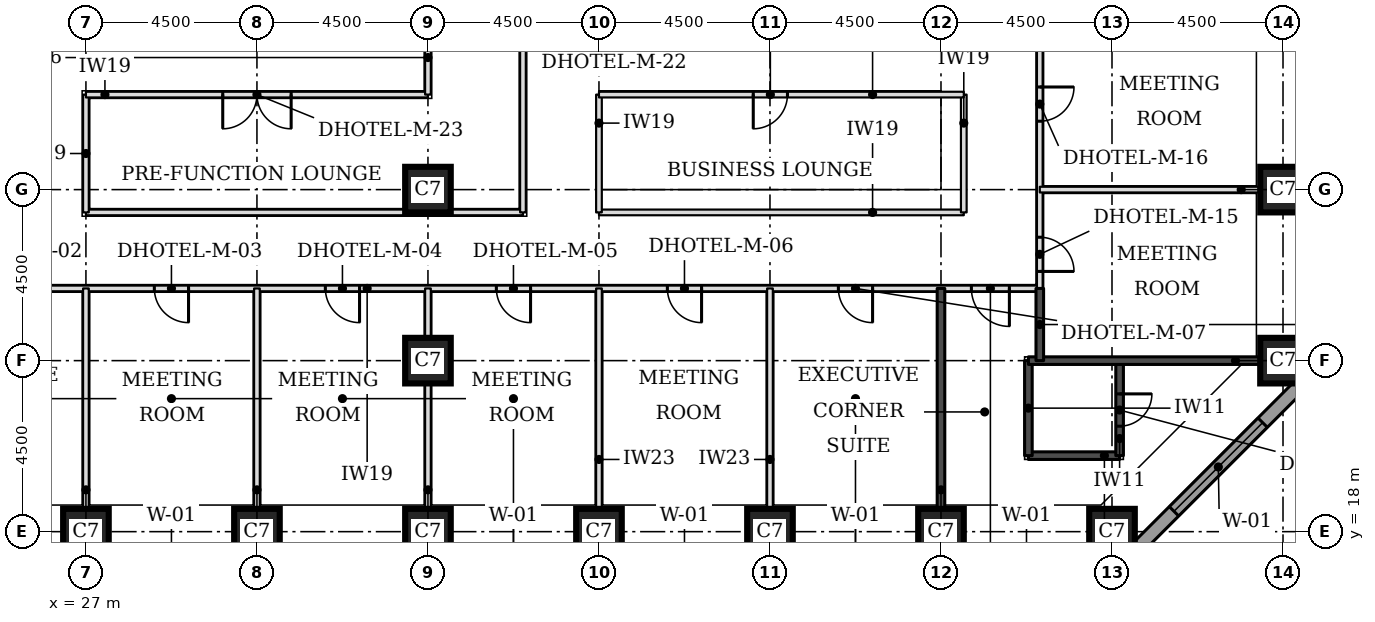
"""IFC4 building model, lengths in metres.
Left out: names, types, materials, properties, quantities, classifications, styles, units other than length and angle.
Written with IfcOpenShell. Run it as: python <this file> out.ifc"""

import sys

from ifc_helpers import new_model, si_unit, direction, frame, frame_2d, origin, origin_2d, place, context, subcontext, project, spatial, rectangle, extrude, element, fill, save


model = new_model("IFC4")
c1 = context("Model", 3, precision=1e-05, world=origin(), true_north=direction((0.0, 1.0)))
c2 = subcontext(c1, "Body", "Model", "MODEL_VIEW")
j1 = project(units=[si_unit("LENGTHUNIT", "METRE"), si_unit("PLANEANGLEUNIT", "RADIAN")], contexts=[c1])
p1 = place(None, origin())
s1 = spatial("IfcSite", under=j1, at=p1, CompositionType="ELEMENT")
p2 = place(p1, origin())
s2 = spatial("IfcBuilding", under=s1, at=p2, CompositionType="ELEMENT")
p3 = place(p2, frame((0.0, 0.0, 23.1)))
s3 = spatial("IfcBuildingStorey", under=s2, at=p3, CompositionType="ELEMENT", Elevation=23.1)
for number, where, z_axis, x_axis in (
    (1, (27.0, 18.0, 0.0), (0.0, 0.0, 1.0), (1.0, 0.0, 0.0)),
    (2, (31.5, 18.0, 0.0), (0.0, 0.0, 1.0), (1.0, 0.0, 0.0)),
    (3, (36.0, 18.0, 0.0), (0.0, 0.0, 1.0), (1.0, 0.0, 0.0)),
    (4, (40.5, 18.0, 0.0), (0.0, 0.0, 1.0), (1.0, 0.0, 0.0)),
    (5, (45.0, 18.0, 0.0), (0.0, 0.0, 1.0), (1.0, 0.0, 0.0)),
    (6, (49.5, 18.0, 0.0), (0.0, 0.0, 1.0), (1.0, 0.0, 0.0)),
    (7, (54.0, 18.0, 0.0), (0.0, 0.0, 1.0), (1.0, 0.0, 0.0)),
    (8, (36.0, 22.5, 0.0), (0.0, 0.0, 1.0), (1.0, 0.0, 0.0)),
    (9, (58.5, 22.5, 0.0), (0.0, 0.0, 1.0), (1.0, 0.0, 0.0)),
    (10, (36.0, 27.0, 0.0), (0.0, 0.0, 1.0), (1.0, 0.0, 0.0)),
    (11, (58.5, 27.0, 0.0), (0.0, 0.0, 1.0), (1.0, 0.0, 0.0)),
):
    element("IfcColumn", number, at=place(p3, frame(where, z_axis=z_axis, x_axis=x_axis)), inside=s3, PredefinedType="COLUMN", context=c2, shape_type="SweptSolid", body=[
        extrude(rectangle(XDim=1.2, YDim=1.2, at=origin_2d()), origin(), (0.0, 0.0, 1.0), 3.3),
    ])
p4 = place(p3, frame((54.27, 17.174, 0.0), z_axis=(0.0, 0.0, 1.0), x_axis=(0.707106781187, 0.707106781187, 0.0)))
e12 = element("IfcWall", 12, at=p4, inside=s3, PredefinedType="STANDARD", context=c2, shape_type="SweptSolid", body=[
    extrude(rectangle(XDim=7.151, YDim=0.35, at=frame_2d((3.576, 0.0))), origin(), (0.0, 0.0, 1.0), 3.055),
])
p5 = place(p4, frame((1.926, 0.0, 0.8)))
e13 = element("IfcOpeningElement", 13, at=p5, cuts=e12, PredefinedType="OPENING", context=c2, shape_type="SweptSolid", body=[
    extrude(rectangle(XDim=3.3, YDim=1.5, at=frame_2d((1.65, 0.75))), frame((0.0, 0.185, 0.0), z_axis=(0.0, -1.0, 0.0), x_axis=(1.0, 0.0, 0.0)), (0.0, 0.0, 1.0), 0.37),
])
p6 = place(p3, frame((19.9, 24.4, 0.0), z_axis=(0.0, 0.0, 1.0), x_axis=(1.0, 0.0, 0.0)))
e14 = element("IfcWall", 14, at=p6, inside=s3, PredefinedType="PARTITIONING", context=c2, shape_type="SweptSolid", body=[
    extrude(rectangle(XDim=32.2, YDim=0.15, at=frame_2d((16.1, 0.0))), origin(), (0.0, 0.0, 1.0), 3.08),
])
p7 = place(p6, frame((4.4, 0.0, 0.0)))
e15 = element("IfcOpeningElement", 15, at=p7, cuts=e14, PredefinedType="OPENING", context=c2, shape_type="SweptSolid", body=[
    extrude(rectangle(XDim=0.9, YDim=2.1, at=frame_2d((0.45, 1.05))), frame((0.0, 0.085, 0.0), z_axis=(0.0, -1.0, 0.0), x_axis=(1.0, 0.0, 0.0)), (0.0, 0.0, 1.0), 0.17),
])
p8 = place(p6, frame((8.9, 0.0, 0.0)))
e16 = element("IfcOpeningElement", 16, at=p8, cuts=e14, PredefinedType="OPENING", context=c2, shape_type="SweptSolid", body=[
    extrude(rectangle(XDim=0.9, YDim=2.1, at=frame_2d((0.45, 1.05))), frame((0.0, 0.085, 0.0), z_axis=(0.0, -1.0, 0.0), x_axis=(1.0, 0.0, 0.0)), (0.0, 0.0, 1.0), 0.17),
])
p9 = place(p6, frame((13.4, 0.0, 0.0)))
e17 = element("IfcOpeningElement", 17, at=p9, cuts=e14, PredefinedType="OPENING", context=c2, shape_type="SweptSolid", body=[
    extrude(rectangle(XDim=0.9, YDim=2.1, at=frame_2d((0.45, 1.05))), frame((0.0, 0.085, 0.0), z_axis=(0.0, -1.0, 0.0), x_axis=(1.0, 0.0, 0.0)), (0.0, 0.0, 1.0), 0.17),
])
p10 = place(p6, frame((17.9, 0.0, 0.0)))
e18 = element("IfcOpeningElement", 18, at=p10, cuts=e14, PredefinedType="OPENING", context=c2, shape_type="SweptSolid", body=[
    extrude(rectangle(XDim=0.9, YDim=2.1, at=frame_2d((0.45, 1.05))), frame((0.0, 0.085, 0.0), z_axis=(0.0, -1.0, 0.0), x_axis=(1.0, 0.0, 0.0)), (0.0, 0.0, 1.0), 0.17),
])
p11 = place(p6, frame((22.4, 0.0, 0.0)))
e19 = element("IfcOpeningElement", 19, at=p11, cuts=e14, PredefinedType="OPENING", context=c2, shape_type="SweptSolid", body=[
    extrude(rectangle(XDim=0.9, YDim=2.1, at=frame_2d((0.45, 1.05))), frame((0.0, 0.085, 0.0), z_axis=(0.0, -1.0, 0.0), x_axis=(1.0, 0.0, 0.0)), (0.0, 0.0, 1.0), 0.17),
])
p12 = place(p6, frame((26.9, 0.0, 0.0)))
e20 = element("IfcOpeningElement", 20, at=p12, cuts=e14, PredefinedType="OPENING", context=c2, shape_type="SweptSolid", body=[
    extrude(rectangle(XDim=0.9, YDim=2.1, at=frame_2d((0.45, 1.05))), frame((0.0, 0.085, 0.0), z_axis=(0.0, -1.0, 0.0), x_axis=(1.0, 0.0, 0.0)), (0.0, 0.0, 1.0), 0.17),
])
p13 = place(p6, frame((0.8, 0.0, 0.0)))
e21 = element("IfcOpeningElement", 21, at=p13, cuts=e14, PredefinedType="OPENING", context=c2, shape_type="SweptSolid", body=[
    extrude(rectangle(XDim=1.0, YDim=2.1, at=frame_2d((0.5, 1.05))), frame((0.0, 0.085, 0.0), z_axis=(0.0, -1.0, 0.0), x_axis=(1.0, 0.0, 0.0)), (0.0, 0.0, 1.0), 0.17),
])
p14 = place(p6, frame((30.4, 0.0, 0.0)))
e22 = element("IfcOpeningElement", 22, at=p14, cuts=e14, PredefinedType="OPENING", context=c2, shape_type="SweptSolid", body=[
    extrude(rectangle(XDim=1.0, YDim=2.1, at=frame_2d((0.5, 1.05))), frame((0.0, 0.085, 0.0), z_axis=(0.0, -1.0, 0.0), x_axis=(1.0, 0.0, 0.0)), (0.0, 0.0, 1.0), 0.17),
])
p15 = place(p3, frame((52.1, 24.4, 0.0), z_axis=(0.0, 0.0, 1.0), x_axis=(0.0, 1.0, 0.0)))
e23 = element("IfcWall", 23, at=p15, inside=s3, PredefinedType="PARTITIONING", context=c2, shape_type="SweptSolid", body=[
    extrude(rectangle(XDim=23.1, YDim=0.15, at=frame_2d((11.55, 0.0))), origin(), (0.0, 0.0, 1.0), 3.08),
])
p16 = place(p15, frame((0.447, 0.0, 0.0)))
e24 = element("IfcOpeningElement", 24, at=p16, cuts=e23, PredefinedType="OPENING", context=c2, shape_type="SweptSolid", body=[
    extrude(rectangle(XDim=0.9, YDim=2.1, at=frame_2d((0.45, 1.05))), frame((0.0, 0.085, 0.0), z_axis=(0.0, -1.0, 0.0), x_axis=(1.0, 0.0, 0.0)), (0.0, 0.0, 1.0), 0.17),
])
p17 = place(p15, frame((4.4, 0.0, 0.0)))
e25 = element("IfcOpeningElement", 25, at=p17, cuts=e23, PredefinedType="OPENING", context=c2, shape_type="SweptSolid", body=[
    extrude(rectangle(XDim=0.9, YDim=2.1, at=frame_2d((0.45, 1.05))), frame((0.0, 0.085, 0.0), z_axis=(0.0, -1.0, 0.0), x_axis=(1.0, 0.0, 0.0)), (0.0, 0.0, 1.0), 0.17),
])
p18 = place(p15, frame((8.9, 0.0, 0.0)))
e26 = element("IfcOpeningElement", 26, at=p18, cuts=e23, PredefinedType="OPENING", context=c2, shape_type="SweptSolid", body=[
    extrude(rectangle(XDim=0.9, YDim=2.1, at=frame_2d((0.45, 1.05))), frame((0.0, 0.085, 0.0), z_axis=(0.0, -1.0, 0.0), x_axis=(1.0, 0.0, 0.0)), (0.0, 0.0, 1.0), 0.17),
])
p19 = place(p15, frame((13.4, 0.0, 0.0)))
e27 = element("IfcOpeningElement", 27, at=p19, cuts=e23, PredefinedType="OPENING", context=c2, shape_type="SweptSolid", body=[
    extrude(rectangle(XDim=0.9, YDim=2.1, at=frame_2d((0.45, 1.05))), frame((0.0, 0.085, 0.0), z_axis=(0.0, -1.0, 0.0), x_axis=(1.0, 0.0, 0.0)), (0.0, 0.0, 1.0), 0.17),
])
p20 = place(p15, frame((19.15, 0.0, 0.0)))
e28 = element("IfcOpeningElement", 28, at=p20, cuts=e23, PredefinedType="OPENING", context=c2, shape_type="SweptSolid", body=[
    extrude(rectangle(XDim=0.9, YDim=2.1, at=frame_2d((0.45, 1.05))), frame((0.0, 0.085, 0.0), z_axis=(0.0, -1.0, 0.0), x_axis=(1.0, 0.0, 0.0)), (0.0, 0.0, 1.0), 0.17),
])
p21 = place(p3, frame((27.0, 26.4, 0.0), z_axis=(0.0, 0.0, 1.0), x_axis=(1.0, 0.0, 0.0)))
e29 = element("IfcWall", 29, at=p21, inside=s3, PredefinedType="PARTITIONING", context=c2, shape_type="SweptSolid", body=[
    extrude(rectangle(XDim=11.5, YDim=0.15, at=frame_2d((5.75, 0.0))), origin(), (0.0, 0.0, 1.0), 3.08),
])
p22 = place(p3, frame((27.0, 26.4, 0.0), z_axis=(0.0, 0.0, 1.0), x_axis=(0.0, 1.0, 0.0)))
e30 = element("IfcWall", 30, at=p22, inside=s3, PredefinedType="PARTITIONING", context=c2, shape_type="SweptSolid", body=[
    extrude(rectangle(XDim=3.1, YDim=0.15, at=frame_2d((1.55, 0.0))), origin(), (0.0, 0.0, 1.0), 3.08),
])
p23 = place(p3, frame((38.5, 26.4, 0.0), z_axis=(0.0, 0.0, 1.0), x_axis=(0.0, 1.0, 0.0)))
e31 = element("IfcWall", 31, at=p23, inside=s3, PredefinedType="PARTITIONING", context=c2, shape_type="SweptSolid", body=[
    extrude(rectangle(XDim=14.1, YDim=0.15, at=frame_2d((7.05, 0.0))), origin(), (0.0, 0.0, 1.0), 3.08),
])
p24 = place(p23, frame((6.15, 0.0, 0.0)))
e32 = element("IfcOpeningElement", 32, at=p24, cuts=e31, PredefinedType="OPENING", context=c2, shape_type="SweptSolid", body=[
    extrude(rectangle(XDim=1.8, YDim=2.1, at=frame_2d((0.9, 1.05))), frame((0.0, 0.085, 0.0), z_axis=(0.0, -1.0, 0.0), x_axis=(1.0, 0.0, 0.0)), (0.0, 0.0, 1.0), 0.17),
])
p25 = place(p3, frame((40.5, 26.4, 0.0), z_axis=(0.0, 0.0, 1.0), x_axis=(1.0, 0.0, 0.0)))
e33 = element("IfcWall", 33, at=p25, inside=s3, PredefinedType="PARTITIONING", context=c2, shape_type="SweptSolid", body=[
    extrude(rectangle(XDim=9.6, YDim=0.15, at=frame_2d((4.8, 0.0))), origin(), (0.0, 0.0, 1.0), 3.08),
])
for number, where, z_axis, x_axis in (
    (34, (40.5, 26.4, 0.0), (0.0, 0.0, 1.0), (0.0, 1.0, 0.0)),
    (35, (50.1, 26.4, 0.0), (0.0, 0.0, 1.0), (0.0, 1.0, 0.0)),
):
    element("IfcWall", number, at=place(p3, frame(where, z_axis=z_axis, x_axis=x_axis)), inside=s3, PredefinedType="PARTITIONING", context=c2, shape_type="SweptSolid", body=[
        extrude(rectangle(XDim=3.1, YDim=0.15, at=frame_2d((1.55, 0.0))), origin(), (0.0, 0.0, 1.0), 3.08),
    ])
p26 = place(p3, frame((27.0, 29.5, 0.0), z_axis=(0.0, 0.0, 1.0), x_axis=(1.0, 0.0, 0.0)))
e36 = element("IfcWall", 36, at=p26, inside=s3, PredefinedType="PARTITIONING", context=c2, shape_type="SweptSolid", body=[
    extrude(rectangle(XDim=9.0, YDim=0.15, at=frame_2d((4.5, 0.0))), origin(), (0.0, 0.0, 1.0), 3.08),
])
p27 = place(p26, frame((3.6, 0.0, 0.0)))
e37 = element("IfcOpeningElement", 37, at=p27, cuts=e36, PredefinedType="OPENING", context=c2, shape_type="SweptSolid", body=[
    extrude(rectangle(XDim=1.8, YDim=2.1, at=frame_2d((0.9, 1.05))), frame((0.0, 0.085, 0.0), z_axis=(0.0, -1.0, 0.0), x_axis=(1.0, 0.0, 0.0)), (0.0, 0.0, 1.0), 0.17),
])
p28 = place(p3, frame((36.0, 29.5, 0.0), z_axis=(0.0, 0.0, 1.0), x_axis=(0.0, 1.0, 0.0)))
e38 = element("IfcWall", 38, at=p28, inside=s3, PredefinedType="PARTITIONING", context=c2, shape_type="SweptSolid", body=[
    extrude(rectangle(XDim=1.95, YDim=0.15, at=frame_2d((0.975, 0.0))), origin(), (0.0, 0.0, 1.0), 2.33),
])
p29 = place(p3, frame((40.5, 29.5, 0.0), z_axis=(0.0, 0.0, 1.0), x_axis=(1.0, 0.0, 0.0)))
e39 = element("IfcWall", 39, at=p29, inside=s3, PredefinedType="PARTITIONING", context=c2, shape_type="SweptSolid", body=[
    extrude(rectangle(XDim=9.6, YDim=0.15, at=frame_2d((4.8, 0.0))), origin(), (0.0, 0.0, 1.0), 3.08),
])
p30 = place(p29, frame((4.06, 0.0, 0.0)))
e40 = element("IfcOpeningElement", 40, at=p30, cuts=e39, PredefinedType="OPENING", context=c2, shape_type="SweptSolid", body=[
    extrude(rectangle(XDim=0.9, YDim=2.1, at=frame_2d((0.45, 1.05))), frame((0.0, 0.085, 0.0), z_axis=(0.0, -1.0, 0.0), x_axis=(1.0, 0.0, 0.0)), (0.0, 0.0, 1.0), 0.17),
])
p31 = place(p3, frame((49.5, 18.6, 0.0), z_axis=(0.0, 0.0, 1.0), x_axis=(0.0, 1.0, 0.0)))
e41 = element("IfcWall", 41, at=p31, inside=s3, PredefinedType="SOLIDWALL", context=c2, shape_type="SweptSolid", body=[
    extrude(rectangle(XDim=5.8, YDim=0.2, at=frame_2d((2.9, 0.0))), origin(), (0.0, 0.0, 1.0), 3.08),
])
p32 = place(p3, frame((51.8, 20.0, 0.0), z_axis=(0.0, 0.0, 1.0), x_axis=(1.0, 0.0, 0.0)))
e42 = element("IfcWall", 42, at=p32, inside=s3, PredefinedType="SOLIDWALL", context=c2, shape_type="SweptSolid", body=[
    extrude(rectangle(XDim=2.4, YDim=0.2, at=frame_2d((1.2, 0.0))), origin(), (0.0, 0.0, 1.0), 3.08),
])
p33 = place(p3, frame((51.8, 20.0, 0.0), z_axis=(0.0, 0.0, 1.0), x_axis=(0.0, 1.0, 0.0)))
e43 = element("IfcWall", 43, at=p33, inside=s3, PredefinedType="SOLIDWALL", context=c2, shape_type="SweptSolid", body=[
    extrude(rectangle(XDim=2.5, YDim=0.2, at=frame_2d((1.25, 0.0))), origin(), (0.0, 0.0, 1.0), 3.08),
])
p34 = place(p3, frame((54.2, 20.0, 0.0), z_axis=(0.0, 0.0, 1.0), x_axis=(0.0, 1.0, 0.0)))
e44 = element("IfcWall", 44, at=p34, inside=s3, PredefinedType="SOLIDWALL", context=c2, shape_type="SweptSolid", body=[
    extrude(rectangle(XDim=2.5, YDim=0.2, at=frame_2d((1.25, 0.0))), origin(), (0.0, 0.0, 1.0), 3.08),
])
p35 = place(p34, frame((0.775, 0.0, 0.0)))
e45 = element("IfcOpeningElement", 45, at=p35, cuts=e44, PredefinedType="OPENING", context=c2, shape_type="SweptSolid", body=[
    extrude(rectangle(XDim=0.85, YDim=2.1, at=frame_2d((0.425, 1.05))), frame((0.0, 0.11, 0.0), z_axis=(0.0, -1.0, 0.0), x_axis=(1.0, 0.0, 0.0)), (0.0, 0.0, 1.0), 0.22),
])
p36 = place(p3, frame((51.8, 22.5, 0.0), z_axis=(0.0, 0.0, 1.0), x_axis=(1.0, 0.0, 0.0)))
e46 = element("IfcWall", 46, at=p36, inside=s3, PredefinedType="SOLIDWALL", context=c2, shape_type="SweptSolid", body=[
    extrude(rectangle(XDim=6.1, YDim=0.2, at=frame_2d((3.05, 0.0))), origin(), (0.0, 0.0, 1.0), 3.08),
])
p37 = place(p3, frame((52.1, 22.5, 0.0), z_axis=(0.0, 0.0, 1.0), x_axis=(0.0, 1.0, 0.0)))
e47 = element("IfcWall", 47, at=p37, inside=s3, PredefinedType="SOLIDWALL", context=c2, shape_type="SweptSolid", body=[
    extrude(rectangle(XDim=1.9, YDim=0.2, at=frame_2d((0.95, 0.0))), origin(), (0.0, 0.0, 1.0), 3.08),
])
for number, where, z_axis, x_axis in (
    (48, (27.0, 18.6, 0.0), (0.0, 0.0, 1.0), (0.0, 1.0, 0.0)),
    (49, (31.5, 18.6, 0.0), (0.0, 0.0, 1.0), (0.0, 1.0, 0.0)),
):
    element("IfcWall", number, at=place(p3, frame(where, z_axis=z_axis, x_axis=x_axis)), inside=s3, PredefinedType="PARTITIONING", context=c2, shape_type="SweptSolid", body=[
        extrude(rectangle(XDim=5.8, YDim=0.15, at=frame_2d((2.9, 0.0))), origin(), (0.0, 0.0, 1.0), 3.08),
    ])
p38 = place(p3, frame((36.0, 18.6, 0.0), z_axis=(0.0, 0.0, 1.0), x_axis=(0.0, 1.0, 0.0)))
e50 = element("IfcWall", 50, at=p38, inside=s3, PredefinedType="PARTITIONING", context=c2, shape_type="SweptSolid", body=[
    extrude(rectangle(XDim=5.8, YDim=0.15, at=frame_2d((2.9, 0.0))), origin(), (0.0, 0.0, 1.0), 2.33),
])
for number, where, z_axis, x_axis in (
    (51, (40.5, 18.6, 0.0), (0.0, 0.0, 1.0), (0.0, 1.0, 0.0)),
    (52, (45.0, 18.6, 0.0), (0.0, 0.0, 1.0), (0.0, 1.0, 0.0)),
    (53, (52.1, 27.0, 0.0), (0.0, 0.0, 1.0), (1.0, 0.0, 0.0)),
):
    element("IfcWall", number, at=place(p3, frame(where, z_axis=z_axis, x_axis=x_axis)), inside=s3, PredefinedType="PARTITIONING", context=c2, shape_type="SweptSolid", body=[
        extrude(rectangle(XDim=5.8, YDim=0.15, at=frame_2d((2.9, 0.0))), origin(), (0.0, 0.0, 1.0), 3.08),
    ])
p39 = place(p5, origin())
e54 = element("IfcWindow", 54, at=p39, inside=s3, PartitioningType="SINGLE_PANEL", PredefinedType="WINDOW", context=c2, shape_type="SweptSolid", body=[
    extrude(rectangle(XDim=3.3, YDim=1.5, at=frame_2d((1.65, 0.75))), frame((0.0, 0.085, 0.0), z_axis=(0.0, -1.0, 0.0), x_axis=(1.0, 0.0, 0.0)), (0.0, 0.0, 1.0), 0.06),
])
fill(e13, e54)
p40 = place(p8, frame((0.9, 0.0, 0.0), z_axis=(0.0, 0.0, 1.0), x_axis=(-1.0, 0.0, 0.0)))
e55 = element("IfcDoor", 55, at=p40, inside=s3, OperationType="SINGLE_SWING_LEFT", PredefinedType="DOOR", context=c2, shape_type="SweptSolid", body=[
    extrude(rectangle(XDim=0.9, YDim=2.1, at=frame_2d((0.45, 1.05))), frame((0.0, 0.025, 0.0), z_axis=(0.0, -1.0, 0.0), x_axis=(1.0, 0.0, 0.0)), (0.0, 0.0, 1.0), 0.05),
])
fill(e16, e55)
p41 = place(p9, frame((0.9, 0.0, 0.0), z_axis=(0.0, 0.0, 1.0), x_axis=(-1.0, 0.0, 0.0)))
e56 = element("IfcDoor", 56, at=p41, inside=s3, OperationType="SINGLE_SWING_LEFT", PredefinedType="DOOR", context=c2, shape_type="SweptSolid", body=[
    extrude(rectangle(XDim=0.9, YDim=2.1, at=frame_2d((0.45, 1.05))), frame((0.0, 0.025, 0.0), z_axis=(0.0, -1.0, 0.0), x_axis=(1.0, 0.0, 0.0)), (0.0, 0.0, 1.0), 0.05),
])
fill(e17, e56)
p42 = place(p10, frame((0.9, 0.0, 0.0), z_axis=(0.0, 0.0, 1.0), x_axis=(-1.0, 0.0, 0.0)))
e57 = element("IfcDoor", 57, at=p42, inside=s3, OperationType="SINGLE_SWING_LEFT", PredefinedType="DOOR", context=c2, shape_type="SweptSolid", body=[
    extrude(rectangle(XDim=0.9, YDim=2.1, at=frame_2d((0.45, 1.05))), frame((0.0, 0.025, 0.0), z_axis=(0.0, -1.0, 0.0), x_axis=(1.0, 0.0, 0.0)), (0.0, 0.0, 1.0), 0.05),
])
fill(e18, e57)
p43 = place(p11, frame((0.9, 0.0, 0.0), z_axis=(0.0, 0.0, 1.0), x_axis=(-1.0, 0.0, 0.0)))
e58 = element("IfcDoor", 58, at=p43, inside=s3, OperationType="SINGLE_SWING_LEFT", PredefinedType="DOOR", context=c2, shape_type="SweptSolid", body=[
    extrude(rectangle(XDim=0.9, YDim=2.1, at=frame_2d((0.45, 1.05))), frame((0.0, 0.025, 0.0), z_axis=(0.0, -1.0, 0.0), x_axis=(1.0, 0.0, 0.0)), (0.0, 0.0, 1.0), 0.05),
])
fill(e19, e58)
p44 = place(p12, frame((0.9, 0.0, 0.0), z_axis=(0.0, 0.0, 1.0), x_axis=(-1.0, 0.0, 0.0)))
e59 = element("IfcDoor", 59, at=p44, inside=s3, OperationType="SINGLE_SWING_LEFT", PredefinedType="DOOR", context=c2, shape_type="SweptSolid", body=[
    extrude(rectangle(XDim=0.9, YDim=2.1, at=frame_2d((0.45, 1.05))), frame((0.0, 0.025, 0.0), z_axis=(0.0, -1.0, 0.0), x_axis=(1.0, 0.0, 0.0)), (0.0, 0.0, 1.0), 0.05),
])
fill(e20, e59)
p45 = place(p16, frame((0.9, 0.0, 0.0), z_axis=(0.0, 0.0, 1.0), x_axis=(-1.0, 0.0, 0.0)))
e60 = element("IfcDoor", 60, at=p45, inside=s3, OperationType="SINGLE_SWING_RIGHT", PredefinedType="DOOR", context=c2, shape_type="SweptSolid", body=[
    extrude(rectangle(XDim=0.9, YDim=2.1, at=frame_2d((0.45, 1.05))), frame((0.0, 0.025, 0.0), z_axis=(0.0, -1.0, 0.0), x_axis=(1.0, 0.0, 0.0)), (0.0, 0.0, 1.0), 0.05),
])
fill(e24, e60)
p46 = place(p17, frame((0.9, 0.0, 0.0), z_axis=(0.0, 0.0, 1.0), x_axis=(-1.0, 0.0, 0.0)))
e61 = element("IfcDoor", 61, at=p46, inside=s3, OperationType="SINGLE_SWING_LEFT", PredefinedType="DOOR", context=c2, shape_type="SweptSolid", body=[
    extrude(rectangle(XDim=0.9, YDim=2.1, at=frame_2d((0.45, 1.05))), frame((0.0, 0.025, 0.0), z_axis=(0.0, -1.0, 0.0), x_axis=(1.0, 0.0, 0.0)), (0.0, 0.0, 1.0), 0.05),
])
fill(e25, e61)
p47 = place(p14, frame((1.0, 0.0, 0.0), z_axis=(0.0, 0.0, 1.0), x_axis=(-1.0, 0.0, 0.0)))
e62 = element("IfcDoor", 62, at=p47, inside=s3, OperationType="SINGLE_SWING_LEFT", PredefinedType="DOOR", context=c2, shape_type="SweptSolid", body=[
    extrude(rectangle(XDim=1.0, YDim=2.1, at=frame_2d((0.5, 1.05))), frame((0.0, 0.025, 0.0), z_axis=(0.0, -1.0, 0.0), x_axis=(1.0, 0.0, 0.0)), (0.0, 0.0, 1.0), 0.05),
])
fill(e22, e62)
p48 = place(p35, frame((0.85, 0.0, 0.0), z_axis=(0.0, 0.0, 1.0), x_axis=(-1.0, 0.0, 0.0)))
e63 = element("IfcDoor", 63, at=p48, inside=s3, OperationType="SINGLE_SWING_LEFT", PredefinedType="DOOR", context=c2, shape_type="SweptSolid", body=[
    extrude(rectangle(XDim=0.85, YDim=2.1, at=frame_2d((0.425, 1.05))), frame((0.0, 0.025, 0.0), z_axis=(0.0, -1.0, 0.0), x_axis=(1.0, 0.0, 0.0)), (0.0, 0.0, 1.0), 0.05),
])
fill(e45, e63)
p49 = place(p27, frame((1.8, 0.0, 0.0), z_axis=(0.0, 0.0, 1.0), x_axis=(-1.0, 0.0, 0.0)))
e64 = element("IfcDoor", 64, at=p49, inside=s3, OperationType="DOUBLE_DOOR_SINGLE_SWING", PredefinedType="DOOR", context=c2, shape_type="SweptSolid", body=[
    extrude(rectangle(XDim=1.8, YDim=2.1, at=frame_2d((0.9, 1.05))), frame((0.0, 0.025, 0.0), z_axis=(0.0, -1.0, 0.0), x_axis=(1.0, 0.0, 0.0)), (0.0, 0.0, 1.0), 0.05),
])
fill(e37, e64)
p50 = place(p30, frame((0.9, 0.0, 0.0), z_axis=(0.0, 0.0, 1.0), x_axis=(-1.0, 0.0, 0.0)))
e65 = element("IfcDoor", 65, at=p50, inside=s3, OperationType="SINGLE_SWING_RIGHT", PredefinedType="DOOR", context=c2, shape_type="SweptSolid", body=[
    extrude(rectangle(XDim=0.9, YDim=2.1, at=frame_2d((0.45, 1.05))), frame((0.0, 0.025, 0.0), z_axis=(0.0, -1.0, 0.0), x_axis=(1.0, 0.0, 0.0)), (0.0, 0.0, 1.0), 0.05),
])
fill(e40, e65)
save(model, sys.argv[1])
